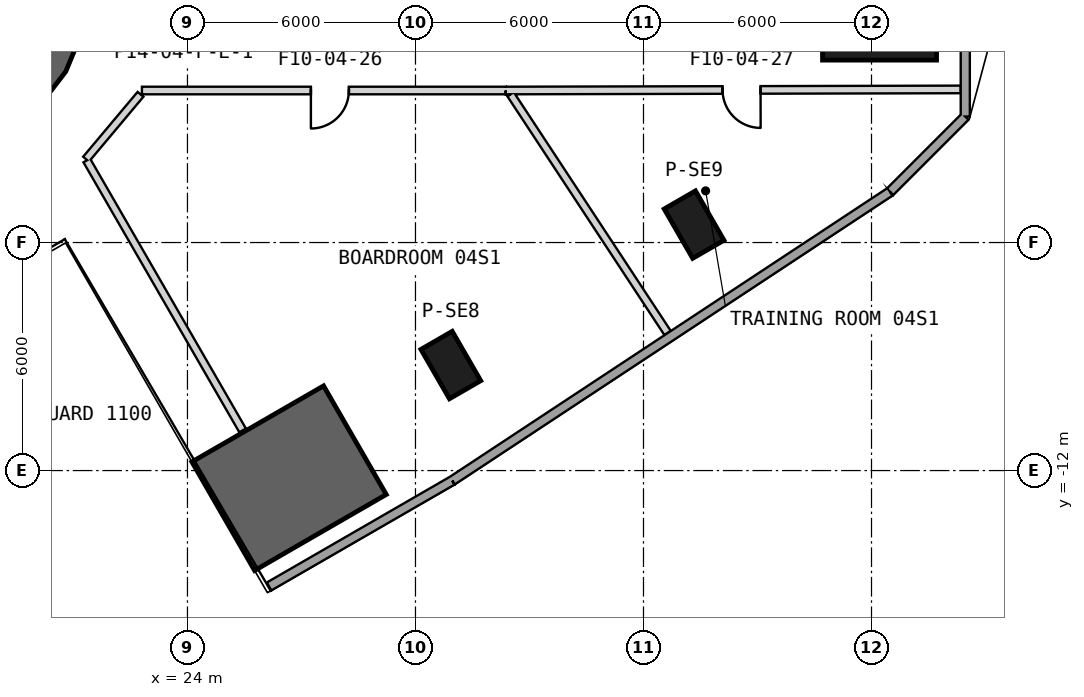
"""IFC4 building model, lengths in metres.
Left out: names, types, materials, properties, quantities, classifications, styles, units other than length and angle.
Written with IfcOpenShell. Run it as: python <this file> out.ifc"""

import sys

from ifc_helpers import new_model, si_unit, direction, frame, frame_2d, origin, origin_2d, place, context, subcontext, project, spatial, polyline, rectangle, outline, extrude, element, fill, save


model = new_model("IFC4")
c1 = context("Model", 3, precision=1e-05, world=origin(), true_north=direction((0.0, 1.0)))
c2 = subcontext(c1, "Body", "Model", "MODEL_VIEW")
j1 = project(units=[si_unit("LENGTHUNIT", "METRE"), si_unit("PLANEANGLEUNIT", "RADIAN")], contexts=[c1])
p1 = place(None, origin())
s1 = spatial("IfcSite", under=j1, at=p1, CompositionType="ELEMENT")
p2 = place(p1, origin())
s2 = spatial("IfcBuilding", under=s1, at=p2, CompositionType="ELEMENT")
p3 = place(p2, frame((0.0, 0.0, 27.5)))
s3 = spatial("IfcBuildingStorey", under=s2, at=p3, CompositionType="ELEMENT", Elevation=27.5)
p4 = place(p3, frame((42.211, 0.0, 0.0), z_axis=(0.0, 0.0, 1.0), x_axis=(1.0, 0.0, 0.0)))
e1 = element("IfcColumn", 1, at=p4, inside=s3, PredefinedType="COLUMN", context=c2, shape_type="SweptSolid", body=[
    extrude(rectangle(XDim=3.0, YDim=2.4, at=origin_2d()), origin(), (0.0, 0.0, 1.0), 6.0),
])
for number, where, z_axis, x_axis in (
    (2, (30.93, -9.224, 0.0), (0.0, 0.0, 1.0), (0.5, -0.866, 0.0)),
    (3, (37.331, -5.528, 0.0), (0.0, 0.0, 1.0), (0.5, -0.866, 0.0)),
):
    element("IfcColumn", number, at=place(p3, frame(where, z_axis=z_axis, x_axis=x_axis)), inside=s3, PredefinedType="COLUMN", context=c2, shape_type="SweptSolid", body=[
        extrude(rectangle(XDim=1.5, YDim=0.95, at=origin_2d()), origin(), (0.0, 0.0, 1.0), 6.0),
    ])
p5 = place(p3, origin())
e4 = element("IfcWall", 4, at=p5, inside=s3, PredefinedType="SHEAR", context=c2, shape_type="SweptSolid", body=[
    extrude(outline(polyline([(19.7, -2.598), (20.321, -2.121), (20.798, -1.5), (21.098, -0.777), (21.2, 0.0), (21.098, 0.777), (20.798, 1.5), (20.321, 2.121), (19.7, 2.598), (19.25, 1.819), (19.685, 1.485), (20.019, 1.05), (20.229, 0.543), (20.3, 0.0), (20.229, -0.543), (20.019, -1.05), (19.685, -1.485), (19.25, -1.819), (19.7, -2.598)])), origin(), (0.0, 0.0, 1.0), 6.0),
])
p6 = place(p3, origin())
e5 = element("IfcWall", 5, at=p6, inside=s3, PredefinedType="SHEAR", context=c2, shape_type="SweptSolid", body=[
    extrude(outline(polyline([(25.767, -14.63), (29.231, -12.63), (27.581, -9.772), (24.117, -11.772), (25.767, -14.63)])), origin(), (0.0, 0.0, 1.0), 6.0),
])
p7 = place(p3, frame((26.147, -15.05, 0.0), z_axis=(0.0, 0.0, 1.0), x_axis=(0.865999312459, 0.500045188778, 0.0)))
e6 = element("IfcWall", 6, at=p7, inside=s3, PredefinedType="SOLIDWALL", context=c2, shape_type="SweptSolid", body=[
    extrude(rectangle(XDim=5.566, YDim=0.24, at=frame_2d((2.783, 0.0))), origin(), (0.0, 0.0, 1.0), 5.7),
])
p8 = place(p3, frame((30.968, -12.267, 0.0), z_axis=(0.0, 0.0, 1.0), x_axis=(0.834683405501, 0.550730072342, 0.0)))
e7 = element("IfcWall", 7, at=p8, inside=s3, PredefinedType="SOLIDWALL", context=c2, shape_type="SweptSolid", body=[
    extrude(rectangle(XDim=13.801, YDim=0.24, at=frame_2d((6.901, 0.0))), origin(), (0.0, 0.0, 1.0), 5.7),
])
p9 = place(p3, frame((42.487, -4.666, 0.0), z_axis=(0.0, 0.0, 1.0), x_axis=(0.707106781187, 0.707106781187, 0.0)))
e8 = element("IfcWall", 8, at=p9, inside=s3, PredefinedType="SOLIDWALL", context=c2, shape_type="SweptSolid", body=[
    extrude(rectangle(XDim=2.801, YDim=0.24, at=frame_2d((1.4, 0.0))), origin(), (0.0, 0.0, 1.0), 5.7),
])
p10 = place(p3, frame((44.468, -2.686, 0.0), z_axis=(0.0, 0.0, 1.0), x_axis=(0.0, 1.0, 0.0)))
e9 = element("IfcWall", 9, at=p10, inside=s3, PredefinedType="SOLIDWALL", context=c2, shape_type="SweptSolid", body=[
    extrude(rectangle(XDim=5.371, YDim=0.24, at=frame_2d((2.686, 0.0))), origin(), (0.0, 0.0, 1.0), 5.7),
])
p11 = place(p3, frame((32.375, -2.0, 0.0), z_axis=(0.0, 0.0, 1.0), x_axis=(-1.0, 0.0, 0.0)))
e10 = element("IfcWall", 10, at=p11, inside=s3, PredefinedType="PARTITIONING", context=c2, shape_type="SweptSolid", body=[
    extrude(rectangle(XDim=9.573, YDim=0.2, at=frame_2d((4.786, 0.0))), origin(), (0.0, 0.0, 1.0), 5.7),
])
p12 = place(p11, frame((4.127, 0.0, 0.0)))
e11 = element("IfcOpeningElement", 11, at=p12, cuts=e10, PredefinedType="OPENING", context=c2, shape_type="SweptSolid", body=[
    extrude(rectangle(XDim=1.0, YDim=2.1, at=frame_2d((0.5, 1.05))), frame((0.0, 0.11, 0.0), z_axis=(0.0, -1.0, 0.0), x_axis=(1.0, 0.0, 0.0)), (0.0, 0.0, 1.0), 0.22),
])
p13 = place(p3, frame((21.332, -3.807, 0.0), z_axis=(0.0, 0.0, 1.0), x_axis=(0.642927476008, 0.765927059578, 0.0)))
e12 = element("IfcWall", 12, at=p13, inside=s3, PredefinedType="PARTITIONING", context=c2, shape_type="SweptSolid", body=[
    extrude(rectangle(XDim=2.229, YDim=0.2, at=frame_2d((1.115, 0.0))), origin(), (0.0, 0.0, 1.0), 4.78),
])
p14 = place(p3, frame((25.452, -10.944, 0.0), z_axis=(0.0, 0.0, 1.0), x_axis=(-0.499992958048, 0.866029469419, 0.0)))
e13 = element("IfcWall", 13, at=p14, inside=s3, PredefinedType="PARTITIONING", context=c2, shape_type="SweptSolid", body=[
    extrude(rectangle(XDim=8.203, YDim=0.2, at=frame_2d((4.102, 0.0))), origin(), (0.0, 0.0, 1.0), 5.07),
])
p15 = place(p3, frame((44.347, -1.971, 0.0), z_axis=(0.0, 0.0, 1.0), x_axis=(-0.999997105116, -0.002406192056, 0.0)))
e14 = element("IfcWall", 14, at=p15, inside=s3, PredefinedType="PARTITIONING", context=c2, shape_type="SweptSolid", body=[
    extrude(rectangle(XDim=11.973, YDim=0.2, at=frame_2d((5.986, 0.0))), origin(), (0.0, 0.0, 1.0), 5.7),
])
p16 = place(p15, frame((5.267, 0.0, 0.0)))
e15 = element("IfcOpeningElement", 15, at=p16, cuts=e14, PredefinedType="OPENING", context=c2, shape_type="SweptSolid", body=[
    extrude(rectangle(XDim=1.0, YDim=2.1, at=frame_2d((0.5, 1.05))), frame((0.0, 0.11, 0.0), z_axis=(0.0, -1.0, 0.0), x_axis=(1.0, 0.0, 0.0)), (0.0, 0.0, 1.0), 0.22),
])
p17 = place(p3, frame((36.634, -8.378, 0.0), z_axis=(0.0, 0.0, 1.0), x_axis=(-0.549584280898, 0.835438279102, 0.0)))
e16 = element("IfcWall", 16, at=p17, inside=s3, PredefinedType="PARTITIONING", context=c2, shape_type="SweptSolid", body=[
    extrude(rectangle(XDim=7.515, YDim=0.2, at=frame_2d((3.757, 0.0))), origin(), (0.0, 0.0, 1.0), 4.78),
])
p18 = place(p12, origin())
e17 = element("IfcDoor", 17, at=p18, inside=s3, OperationType="SINGLE_SWING_RIGHT", PredefinedType="USERDEFINED", context=c2, shape_type="SweptSolid", body=[
    extrude(rectangle(XDim=1.0, YDim=2.1, at=frame_2d((0.5, 1.05))), frame((0.0, 0.025, 0.0), z_axis=(0.0, -1.0, 0.0), x_axis=(1.0, 0.0, 0.0)), (0.0, 0.0, 1.0), 0.05),
])
fill(e11, e17)
p19 = place(p16, origin())
e18 = element("IfcDoor", 18, at=p19, inside=s3, OperationType="SINGLE_SWING_LEFT", PredefinedType="USERDEFINED", context=c2, shape_type="SweptSolid", body=[
    extrude(rectangle(XDim=1.0, YDim=2.1, at=frame_2d((0.5, 1.05))), frame((0.0, 0.025, 0.0), z_axis=(0.0, -1.0, 0.0), x_axis=(1.0, 0.0, 0.0)), (0.0, 0.0, 1.0), 0.05),
])
fill(e15, e18)
save(model, sys.argv[1])
